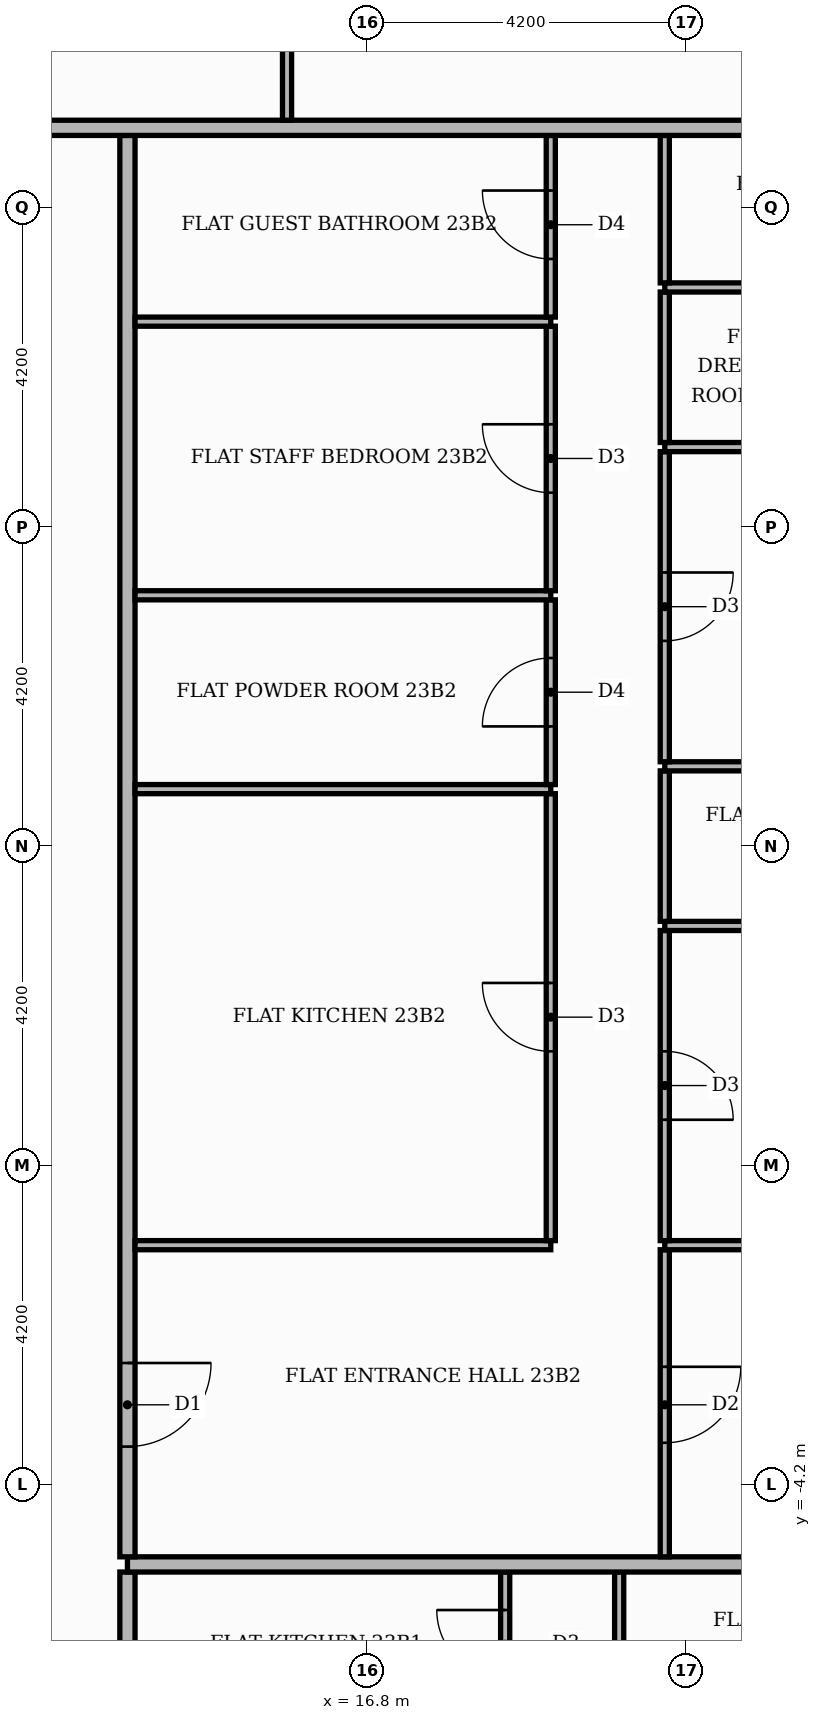
"""IFC4 building model, lengths in metres.
Left out: names, types, materials, properties, quantities, classifications, styles, units other than length and angle.
Written with IfcOpenShell. Run it as: python <this file> out.ifc"""

import sys

from ifc_helpers import new_model, si_unit, direction, frame, frame_2d, origin, place, context, subcontext, project, spatial, rectangle, extrude, element, fill, save


model = new_model("IFC4")
c1 = context("Model", 3, precision=1e-05, world=origin(), true_north=direction((0.0, 1.0)))
c2 = subcontext(c1, "Body", "Model", "MODEL_VIEW")
j1 = project(units=[si_unit("LENGTHUNIT", "METRE"), si_unit("PLANEANGLEUNIT", "RADIAN")], contexts=[c1])
p1 = place(None, origin())
s1 = spatial("IfcSite", under=j1, at=p1, CompositionType="ELEMENT")
p2 = place(p1, origin())
s2 = spatial("IfcBuilding", under=s1, at=p2, CompositionType="ELEMENT")
p3 = place(p2, frame((0.0, 0.0, 98.7)))
s3 = spatial("IfcBuildingStorey", under=s2, at=p3, CompositionType="ELEMENT", Elevation=98.7)
p4 = place(p3, frame((13.65, -13.55, 0.0), z_axis=(0.0, 0.0, 1.0), x_axis=(0.0, 1.0, 0.0)))
e1 = element("IfcWall", 1, at=p4, inside=s3, PredefinedType="PARTITIONING", context=c2, shape_type="SweptSolid", body=[
    extrude(rectangle(XDim=8.2, YDim=0.2, at=frame_2d((4.1, 0.0))), origin(), (0.0, 0.0, 1.0), 3.48),
])
p5 = place(p4, frame((1.45, 0.0, 0.0)))
e2 = element("IfcOpeningElement", 2, at=p5, cuts=e1, PredefinedType="OPENING", context=c2, shape_type="SweptSolid", body=[
    extrude(rectangle(XDim=1.1, YDim=2.4, at=frame_2d((0.55, 1.2))), frame((0.0, 0.11, 0.0), z_axis=(0.0, -1.0, 0.0), x_axis=(1.0, 0.0, 0.0)), (0.0, 0.0, 1.0), 0.22),
])
p6 = place(p3, frame((18.62, -7.29, 0.0), z_axis=(0.0, 0.0, 1.0), x_axis=(0.0, 1.0, 0.0)))
e3 = element("IfcWall", 3, at=p6, inside=s3, PredefinedType="PARTITIONING", context=c2, shape_type="SweptSolid", body=[
    extrude(rectangle(XDim=1.94, YDim=0.12, at=frame_2d((0.97, 0.0))), origin(), (0.0, 0.0, 1.0), 3.48),
])
p7 = place(p6, frame((0.54, 0.0, 0.0)))
e4 = element("IfcOpeningElement", 4, at=p7, cuts=e3, PredefinedType="OPENING", context=c2, shape_type="SweptSolid", body=[
    extrude(rectangle(XDim=0.9, YDim=2.1, at=frame_2d((0.45, 1.05))), frame((0.0, 0.07, 0.0), z_axis=(0.0, -1.0, 0.0), x_axis=(1.0, 0.0, 0.0)), (0.0, 0.0, 1.0), 0.14),
])
p8 = place(p3, frame((20.12, -7.29, 0.0), z_axis=(0.0, 0.0, 1.0), x_axis=(0.0, 1.0, 0.0)))
e5 = element("IfcWall", 5, at=p8, inside=s3, PredefinedType="PARTITIONING", context=c2, shape_type="SweptSolid", body=[
    extrude(rectangle(XDim=1.94, YDim=0.12, at=frame_2d((0.97, 0.0))), origin(), (0.0, 0.0, 1.0), 3.48),
])
p9 = place(p3, frame((13.65, -5.25, 0.0), z_axis=(0.0, 0.0, 1.0), x_axis=(1.0, 0.0, 0.0)))
e6 = element("IfcWall", 6, at=p9, inside=s3, PredefinedType="PARTITIONING", context=c2, shape_type="SweptSolid", body=[
    extrude(rectangle(XDim=11.77, YDim=0.2, at=frame_2d((5.885, 0.0))), origin(), (0.0, 0.0, 1.0), 3.48),
])
p10 = place(p3, frame((13.65, -5.15, 0.0), z_axis=(0.0, 0.0, 1.0), x_axis=(0.0, 1.0, 0.0)))
e7 = element("IfcWall", 7, at=p10, inside=s3, PredefinedType="PARTITIONING", context=c2, shape_type="SweptSolid", body=[
    extrude(rectangle(XDim=18.7, YDim=0.2, at=frame_2d((9.35, 0.0))), origin(), (0.0, 0.0, 1.0), 3.48),
])
p11 = place(p10, frame((1.45, 0.0, 0.0)))
e8 = element("IfcOpeningElement", 8, at=p11, cuts=e7, PredefinedType="OPENING", context=c2, shape_type="SweptSolid", body=[
    extrude(rectangle(XDim=1.1, YDim=2.4, at=frame_2d((0.55, 1.2))), frame((0.0, 0.11, 0.0), z_axis=(0.0, -1.0, 0.0), x_axis=(1.0, 0.0, 0.0)), (0.0, 0.0, 1.0), 0.22),
])
p12 = place(p3, frame((20.72, -5.15, 0.0), z_axis=(0.0, 0.0, 1.0), x_axis=(0.0, 1.0, 0.0)))
e9 = element("IfcWall", 9, at=p12, inside=s3, PredefinedType="PARTITIONING", context=c2, shape_type="SweptSolid", body=[
    extrude(rectangle(XDim=4.04, YDim=0.12, at=frame_2d((2.02, 0.0))), origin(), (0.0, 0.0, 1.0), 3.48),
])
p13 = place(p12, frame((1.5, 0.0, 0.0)))
e10 = element("IfcOpeningElement", 10, at=p13, cuts=e9, PredefinedType="OPENING", context=c2, shape_type="SweptSolid", body=[
    extrude(rectangle(XDim=1.0, YDim=2.1, at=frame_2d((0.5, 1.05))), frame((0.0, 0.07, 0.0), z_axis=(0.0, -1.0, 0.0), x_axis=(1.0, 0.0, 0.0)), (0.0, 0.0, 1.0), 0.14),
])
p14 = place(p3, frame((13.75, -1.05, 0.0), z_axis=(0.0, 0.0, 1.0), x_axis=(1.0, 0.0, 0.0)))
e11 = element("IfcWall", 11, at=p14, inside=s3, PredefinedType="PARTITIONING", context=c2, shape_type="SweptSolid", body=[
    extrude(rectangle(XDim=5.47, YDim=0.12, at=frame_2d((2.735, 0.0))), origin(), (0.0, 0.0, 1.0), 3.48),
])
p15 = place(p3, frame((20.72, -1.05, 0.0), z_axis=(0.0, 0.0, 1.0), x_axis=(1.0, 0.0, 0.0)))
e12 = element("IfcWall", 12, at=p15, inside=s3, PredefinedType="PARTITIONING", context=c2, shape_type="SweptSolid", body=[
    extrude(rectangle(XDim=4.7, YDim=0.12, at=frame_2d((2.35, 0.0))), origin(), (0.0, 0.0, 1.0), 3.48),
])
p16 = place(p3, frame((19.22, -0.99, 0.0), z_axis=(0.0, 0.0, 1.0), x_axis=(0.0, 1.0, 0.0)))
e13 = element("IfcWall", 13, at=p16, inside=s3, PredefinedType="PARTITIONING", context=c2, shape_type="SweptSolid", body=[
    extrude(rectangle(XDim=5.88, YDim=0.12, at=frame_2d((2.94, 0.0))), origin(), (0.0, 0.0, 1.0), 3.48),
])
p17 = place(p16, frame((2.49, 0.0, 0.0)))
e14 = element("IfcOpeningElement", 14, at=p17, cuts=e13, PredefinedType="OPENING", context=c2, shape_type="SweptSolid", body=[
    extrude(rectangle(XDim=0.9, YDim=2.1, at=frame_2d((0.45, 1.05))), frame((0.0, 0.07, 0.0), z_axis=(0.0, -1.0, 0.0), x_axis=(1.0, 0.0, 0.0)), (0.0, 0.0, 1.0), 0.14),
])
p18 = place(p3, frame((20.72, -0.99, 0.0), z_axis=(0.0, 0.0, 1.0), x_axis=(0.0, 1.0, 0.0)))
e15 = element("IfcWall", 15, at=p18, inside=s3, PredefinedType="PARTITIONING", context=c2, shape_type="SweptSolid", body=[
    extrude(rectangle(XDim=4.08, YDim=0.12, at=frame_2d((2.04, 0.0))), origin(), (0.0, 0.0, 1.0), 3.48),
])
p19 = place(p18, frame((1.59, 0.0, 0.0)))
e16 = element("IfcOpeningElement", 16, at=p19, cuts=e15, PredefinedType="OPENING", context=c2, shape_type="SweptSolid", body=[
    extrude(rectangle(XDim=0.9, YDim=2.1, at=frame_2d((0.45, 1.05))), frame((0.0, 0.07, 0.0), z_axis=(0.0, -1.0, 0.0), x_axis=(1.0, 0.0, 0.0)), (0.0, 0.0, 1.0), 0.14),
])
p20 = place(p3, frame((20.72, 3.15, 0.0), z_axis=(0.0, 0.0, 1.0), x_axis=(1.0, 0.0, 0.0)))
e17 = element("IfcWall", 17, at=p20, inside=s3, PredefinedType="PARTITIONING", context=c2, shape_type="SweptSolid", body=[
    extrude(rectangle(XDim=4.7, YDim=0.12, at=frame_2d((2.35, 0.0))), origin(), (0.0, 0.0, 1.0), 3.48),
])
p21 = place(p20, frame((2.05, 0.0, 0.0)))
e18 = element("IfcOpeningElement", 18, at=p21, cuts=e17, PredefinedType="OPENING", context=c2, shape_type="SweptSolid", body=[
    extrude(rectangle(XDim=0.9, YDim=2.1, at=frame_2d((0.45, 1.05))), frame((0.0, 0.07, 0.0), z_axis=(0.0, -1.0, 0.0), x_axis=(1.0, 0.0, 0.0)), (0.0, 0.0, 1.0), 0.14),
])
p22 = place(p3, frame((20.72, 3.21, 0.0), z_axis=(0.0, 0.0, 1.0), x_axis=(0.0, 1.0, 0.0)))
e19 = element("IfcWall", 19, at=p22, inside=s3, PredefinedType="PARTITIONING", context=c2, shape_type="SweptSolid", body=[
    extrude(rectangle(XDim=1.98, YDim=0.12, at=frame_2d((0.99, 0.0))), origin(), (0.0, 0.0, 1.0), 3.48),
])
p23 = place(p3, frame((13.75, 4.95, 0.0), z_axis=(0.0, 0.0, 1.0), x_axis=(1.0, 0.0, 0.0)))
e20 = element("IfcWall", 20, at=p23, inside=s3, PredefinedType="PARTITIONING", context=c2, shape_type="SweptSolid", body=[
    extrude(rectangle(XDim=5.47, YDim=0.12, at=frame_2d((2.735, 0.0))), origin(), (0.0, 0.0, 1.0), 3.48),
])
p24 = place(p3, frame((19.22, 5.01, 0.0), z_axis=(0.0, 0.0, 1.0), x_axis=(0.0, 1.0, 0.0)))
e21 = element("IfcWall", 21, at=p24, inside=s3, PredefinedType="PARTITIONING", context=c2, shape_type="SweptSolid", body=[
    extrude(rectangle(XDim=2.43, YDim=0.12, at=frame_2d((1.215, 0.0))), origin(), (0.0, 0.0, 1.0), 3.48),
])
p25 = place(p24, frame((0.765, 0.0, 0.0)))
e22 = element("IfcOpeningElement", 22, at=p25, cuts=e21, PredefinedType="OPENING", context=c2, shape_type="SweptSolid", body=[
    extrude(rectangle(XDim=0.9, YDim=2.1, at=frame_2d((0.45, 1.05))), frame((0.0, 0.07, 0.0), z_axis=(0.0, -1.0, 0.0), x_axis=(1.0, 0.0, 0.0)), (0.0, 0.0, 1.0), 0.14),
])
p26 = place(p3, frame((20.72, 5.25, 0.0), z_axis=(0.0, 0.0, 1.0), x_axis=(1.0, 0.0, 0.0)))
e23 = element("IfcWall", 23, at=p26, inside=s3, PredefinedType="PARTITIONING", context=c2, shape_type="SweptSolid", body=[
    extrude(rectangle(XDim=4.7, YDim=0.12, at=frame_2d((2.35, 0.0))), origin(), (0.0, 0.0, 1.0), 3.48),
])
p27 = place(p3, frame((20.72, 5.31, 0.0), z_axis=(0.0, 0.0, 1.0), x_axis=(0.0, 1.0, 0.0)))
e24 = element("IfcWall", 24, at=p27, inside=s3, PredefinedType="PARTITIONING", context=c2, shape_type="SweptSolid", body=[
    extrude(rectangle(XDim=4.08, YDim=0.12, at=frame_2d((2.04, 0.0))), origin(), (0.0, 0.0, 1.0), 3.48),
])
p28 = place(p27, frame((1.59, 0.0, 0.0)))
e25 = element("IfcOpeningElement", 25, at=p28, cuts=e24, PredefinedType="OPENING", context=c2, shape_type="SweptSolid", body=[
    extrude(rectangle(XDim=0.9, YDim=2.1, at=frame_2d((0.45, 1.05))), frame((0.0, 0.07, 0.0), z_axis=(0.0, -1.0, 0.0), x_axis=(1.0, 0.0, 0.0)), (0.0, 0.0, 1.0), 0.14),
])
p29 = place(p3, frame((13.75, 7.5, 0.0), z_axis=(0.0, 0.0, 1.0), x_axis=(1.0, 0.0, 0.0)))
e26 = element("IfcWall", 26, at=p29, inside=s3, PredefinedType="PARTITIONING", context=c2, shape_type="SweptSolid", body=[
    extrude(rectangle(XDim=5.47, YDim=0.12, at=frame_2d((2.735, 0.0))), origin(), (0.0, 0.0, 1.0), 3.48),
])
p30 = place(p3, frame((19.22, 7.56, 0.0), z_axis=(0.0, 0.0, 1.0), x_axis=(0.0, 1.0, 0.0)))
e27 = element("IfcWall", 27, at=p30, inside=s3, PredefinedType="PARTITIONING", context=c2, shape_type="SweptSolid", body=[
    extrude(rectangle(XDim=3.48, YDim=0.12, at=frame_2d((1.74, 0.0))), origin(), (0.0, 0.0, 1.0), 3.48),
])
p31 = place(p30, frame((1.29, 0.0, 0.0)))
e28 = element("IfcOpeningElement", 28, at=p31, cuts=e27, PredefinedType="OPENING", context=c2, shape_type="SweptSolid", body=[
    extrude(rectangle(XDim=0.9, YDim=2.1, at=frame_2d((0.45, 1.05))), frame((0.0, 0.07, 0.0), z_axis=(0.0, -1.0, 0.0), x_axis=(1.0, 0.0, 0.0)), (0.0, 0.0, 1.0), 0.14),
])
p32 = place(p3, frame((20.72, 9.45, 0.0), z_axis=(0.0, 0.0, 1.0), x_axis=(1.0, 0.0, 0.0)))
e29 = element("IfcWall", 29, at=p32, inside=s3, PredefinedType="PARTITIONING", context=c2, shape_type="SweptSolid", body=[
    extrude(rectangle(XDim=4.7, YDim=0.12, at=frame_2d((2.35, 0.0))), origin(), (0.0, 0.0, 1.0), 3.48),
])
p33 = place(p32, frame((2.05, 0.0, 0.0)))
e30 = element("IfcOpeningElement", 30, at=p33, cuts=e29, PredefinedType="OPENING", context=c2, shape_type="SweptSolid", body=[
    extrude(rectangle(XDim=0.9, YDim=2.1, at=frame_2d((0.45, 1.05))), frame((0.0, 0.07, 0.0), z_axis=(0.0, -1.0, 0.0), x_axis=(1.0, 0.0, 0.0)), (0.0, 0.0, 1.0), 0.14),
])
p34 = place(p3, frame((20.72, 9.51, 0.0), z_axis=(0.0, 0.0, 1.0), x_axis=(0.0, 1.0, 0.0)))
e31 = element("IfcWall", 31, at=p34, inside=s3, PredefinedType="PARTITIONING", context=c2, shape_type="SweptSolid", body=[
    extrude(rectangle(XDim=1.98, YDim=0.12, at=frame_2d((0.99, 0.0))), origin(), (0.0, 0.0, 1.0), 3.48),
])
p35 = place(p3, frame((13.75, 11.1, 0.0), z_axis=(0.0, 0.0, 1.0), x_axis=(1.0, 0.0, 0.0)))
e32 = element("IfcWall", 32, at=p35, inside=s3, PredefinedType="PARTITIONING", context=c2, shape_type="SweptSolid", body=[
    extrude(rectangle(XDim=5.47, YDim=0.12, at=frame_2d((2.735, 0.0))), origin(), (0.0, 0.0, 1.0), 3.48),
])
p36 = place(p3, frame((19.22, 11.16, 0.0), z_axis=(0.0, 0.0, 1.0), x_axis=(0.0, 1.0, 0.0)))
e33 = element("IfcWall", 33, at=p36, inside=s3, PredefinedType="PARTITIONING", context=c2, shape_type="SweptSolid", body=[
    extrude(rectangle(XDim=2.39, YDim=0.12, at=frame_2d((1.195, 0.0))), origin(), (0.0, 0.0, 1.0), 3.48),
])
p37 = place(p36, frame((0.765, 0.0, 0.0)))
e34 = element("IfcOpeningElement", 34, at=p37, cuts=e33, PredefinedType="OPENING", context=c2, shape_type="SweptSolid", body=[
    extrude(rectangle(XDim=0.9, YDim=2.1, at=frame_2d((0.45, 1.05))), frame((0.0, 0.07, 0.0), z_axis=(0.0, -1.0, 0.0), x_axis=(1.0, 0.0, 0.0)), (0.0, 0.0, 1.0), 0.14),
])
p38 = place(p3, frame((20.72, 11.55, 0.0), z_axis=(0.0, 0.0, 1.0), x_axis=(1.0, 0.0, 0.0)))
e35 = element("IfcWall", 35, at=p38, inside=s3, PredefinedType="PARTITIONING", context=c2, shape_type="SweptSolid", body=[
    extrude(rectangle(XDim=4.7, YDim=0.12, at=frame_2d((2.35, 0.0))), origin(), (0.0, 0.0, 1.0), 3.48),
])
p39 = place(p38, frame((2.05, 0.0, 0.0)))
e36 = element("IfcOpeningElement", 36, at=p39, cuts=e35, PredefinedType="OPENING", context=c2, shape_type="SweptSolid", body=[
    extrude(rectangle(XDim=0.9, YDim=2.1, at=frame_2d((0.45, 1.05))), frame((0.0, 0.07, 0.0), z_axis=(0.0, -1.0, 0.0), x_axis=(1.0, 0.0, 0.0)), (0.0, 0.0, 1.0), 0.14),
])
p40 = place(p3, frame((20.72, 11.61, 0.0), z_axis=(0.0, 0.0, 1.0), x_axis=(0.0, 1.0, 0.0)))
e37 = element("IfcWall", 37, at=p40, inside=s3, PredefinedType="PARTITIONING", context=c2, shape_type="SweptSolid", body=[
    extrude(rectangle(XDim=1.94, YDim=0.12, at=frame_2d((0.97, 0.0))), origin(), (0.0, 0.0, 1.0), 3.48),
])
p41 = place(p3, frame((-13.65, 13.65, 0.0), z_axis=(0.0, 0.0, 1.0), x_axis=(1.0, 0.0, 0.0)))
e38 = element("IfcWall", 38, at=p41, inside=s3, PredefinedType="PARTITIONING", context=c2, shape_type="SweptSolid", body=[
    extrude(rectangle(XDim=39.07, YDim=0.2, at=frame_2d((19.535, 0.0))), origin(), (0.0, 0.0, 1.0), 3.48),
])
p42 = place(p41, frame((24.65, 0.0, 0.0)))
e39 = element("IfcOpeningElement", 39, at=p42, cuts=e38, PredefinedType="OPENING", context=c2, shape_type="SweptSolid", body=[
    extrude(rectangle(XDim=1.1, YDim=2.4, at=frame_2d((0.55, 1.2))), frame((0.0, 0.11, 0.0), z_axis=(0.0, -1.0, 0.0), x_axis=(1.0, 0.0, 0.0)), (0.0, 0.0, 1.0), 0.22),
])
p43 = place(p41, frame((14.15, 0.0, 0.0)))
e40 = element("IfcOpeningElement", 40, at=p43, cuts=e38, PredefinedType="OPENING", context=c2, shape_type="SweptSolid", body=[
    extrude(rectangle(XDim=1.1, YDim=2.4, at=frame_2d((0.55, 1.2))), frame((0.0, 0.11, 0.0), z_axis=(0.0, -1.0, 0.0), x_axis=(1.0, 0.0, 0.0)), (0.0, 0.0, 1.0), 0.22),
])
p44 = place(p3, frame((15.75, 13.75, 0.0), z_axis=(0.0, 0.0, 1.0), x_axis=(0.0, 1.0, 0.0)))
e41 = element("IfcWall", 41, at=p44, inside=s3, PredefinedType="PARTITIONING", context=c2, shape_type="SweptSolid", body=[
    extrude(rectangle(XDim=6.61, YDim=0.12, at=frame_2d((3.305, 0.0))), origin(), (0.0, 0.0, 1.0), 3.48),
])
p45 = place(p44, frame((2.785, 0.0, 0.0)))
e42 = element("IfcOpeningElement", 42, at=p45, cuts=e41, PredefinedType="OPENING", context=c2, shape_type="SweptSolid", body=[
    extrude(rectangle(XDim=1.0, YDim=2.1, at=frame_2d((0.5, 1.05))), frame((0.0, 0.07, 0.0), z_axis=(0.0, -1.0, 0.0), x_axis=(1.0, 0.0, 0.0)), (0.0, 0.0, 1.0), 0.14),
])
p46 = place(p7, origin())
e43 = element("IfcDoor", 43, at=p46, inside=s3, OperationType="SINGLE_SWING_RIGHT", PredefinedType="DOOR", context=c2, shape_type="SweptSolid", body=[
    extrude(rectangle(XDim=0.9, YDim=2.1, at=frame_2d((0.45, 1.05))), frame((0.0, 0.025, 0.0), z_axis=(0.0, -1.0, 0.0), x_axis=(1.0, 0.0, 0.0)), (0.0, 0.0, 1.0), 0.05),
])
fill(e4, e43)
p47 = place(p11, frame((1.1, 0.0, 0.0), z_axis=(0.0, 0.0, 1.0), x_axis=(-1.0, 0.0, 0.0)))
e44 = element("IfcDoor", 44, at=p47, inside=s3, OperationType="SINGLE_SWING_RIGHT", PredefinedType="DOOR", context=c2, shape_type="SweptSolid", body=[
    extrude(rectangle(XDim=1.1, YDim=2.4, at=frame_2d((0.55, 1.2))), frame((0.0, 0.025, 0.0), z_axis=(0.0, -1.0, 0.0), x_axis=(1.0, 0.0, 0.0)), (0.0, 0.0, 1.0), 0.05),
])
fill(e8, e44)
p48 = place(p17, origin())
e45 = element("IfcDoor", 45, at=p48, inside=s3, OperationType="SINGLE_SWING_RIGHT", PredefinedType="DOOR", context=c2, shape_type="SweptSolid", body=[
    extrude(rectangle(XDim=0.9, YDim=2.1, at=frame_2d((0.45, 1.05))), frame((0.0, 0.025, 0.0), z_axis=(0.0, -1.0, 0.0), x_axis=(1.0, 0.0, 0.0)), (0.0, 0.0, 1.0), 0.05),
])
fill(e14, e45)
p49 = place(p25, origin())
e46 = element("IfcDoor", 46, at=p49, inside=s3, OperationType="SINGLE_SWING_LEFT", PredefinedType="DOOR", context=c2, shape_type="SweptSolid", body=[
    extrude(rectangle(XDim=0.9, YDim=2.1, at=frame_2d((0.45, 1.05))), frame((0.0, 0.025, 0.0), z_axis=(0.0, -1.0, 0.0), x_axis=(1.0, 0.0, 0.0)), (0.0, 0.0, 1.0), 0.05),
])
fill(e22, e46)
p50 = place(p31, origin())
e47 = element("IfcDoor", 47, at=p50, inside=s3, OperationType="SINGLE_SWING_RIGHT", PredefinedType="DOOR", context=c2, shape_type="SweptSolid", body=[
    extrude(rectangle(XDim=0.9, YDim=2.1, at=frame_2d((0.45, 1.05))), frame((0.0, 0.025, 0.0), z_axis=(0.0, -1.0, 0.0), x_axis=(1.0, 0.0, 0.0)), (0.0, 0.0, 1.0), 0.05),
])
fill(e28, e47)
p51 = place(p37, origin())
e48 = element("IfcDoor", 48, at=p51, inside=s3, OperationType="SINGLE_SWING_RIGHT", PredefinedType="DOOR", context=c2, shape_type="SweptSolid", body=[
    extrude(rectangle(XDim=0.9, YDim=2.1, at=frame_2d((0.45, 1.05))), frame((0.0, 0.025, 0.0), z_axis=(0.0, -1.0, 0.0), x_axis=(1.0, 0.0, 0.0)), (0.0, 0.0, 1.0), 0.05),
])
fill(e34, e48)
p52 = place(p13, frame((1.0, 0.0, 0.0), z_axis=(0.0, 0.0, 1.0), x_axis=(-1.0, 0.0, 0.0)))
e49 = element("IfcDoor", 49, at=p52, inside=s3, OperationType="SINGLE_SWING_RIGHT", PredefinedType="DOOR", context=c2, shape_type="SweptSolid", body=[
    extrude(rectangle(XDim=1.0, YDim=2.1, at=frame_2d((0.5, 1.05))), frame((0.0, 0.025, 0.0), z_axis=(0.0, -1.0, 0.0), x_axis=(1.0, 0.0, 0.0)), (0.0, 0.0, 1.0), 0.05),
])
fill(e10, e49)
p53 = place(p19, frame((0.9, 0.0, 0.0), z_axis=(0.0, 0.0, 1.0), x_axis=(-1.0, 0.0, 0.0)))
e50 = element("IfcDoor", 50, at=p53, inside=s3, OperationType="SINGLE_SWING_LEFT", PredefinedType="DOOR", context=c2, shape_type="SweptSolid", body=[
    extrude(rectangle(XDim=0.9, YDim=2.1, at=frame_2d((0.45, 1.05))), frame((0.0, 0.025, 0.0), z_axis=(0.0, -1.0, 0.0), x_axis=(1.0, 0.0, 0.0)), (0.0, 0.0, 1.0), 0.05),
])
fill(e16, e50)
p54 = place(p28, frame((0.9, 0.0, 0.0), z_axis=(0.0, 0.0, 1.0), x_axis=(-1.0, 0.0, 0.0)))
e51 = element("IfcDoor", 51, at=p54, inside=s3, OperationType="SINGLE_SWING_RIGHT", PredefinedType="DOOR", context=c2, shape_type="SweptSolid", body=[
    extrude(rectangle(XDim=0.9, YDim=2.1, at=frame_2d((0.45, 1.05))), frame((0.0, 0.025, 0.0), z_axis=(0.0, -1.0, 0.0), x_axis=(1.0, 0.0, 0.0)), (0.0, 0.0, 1.0), 0.05),
])
fill(e25, e51)
save(model, sys.argv[1])
